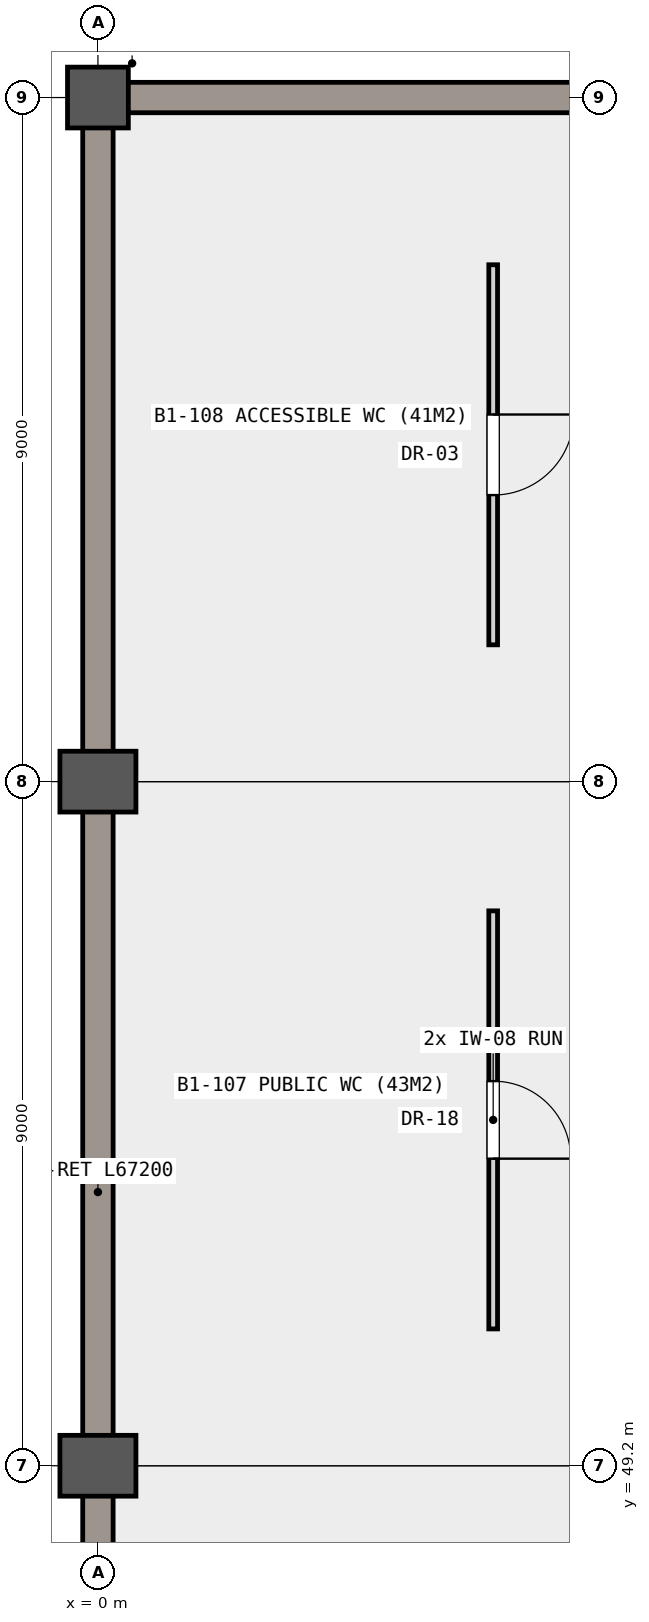
"""IFC4 building model, lengths in metres.
Left out: names, types, materials, properties, quantities, classifications, styles, units other than length and angle.
Written with IfcOpenShell. Run it as: python <this file> out.ifc"""

import sys

from ifc_helpers import new_model, si_unit, direction, frame, frame_2d, origin, origin_2d, place, context, subcontext, project, spatial, rectangle, extrude, element, fill, save


model = new_model("IFC4")
c1 = context("Model", 3, precision=1e-05, world=origin(), true_north=direction((0.0, 1.0)))
c2 = subcontext(c1, "Body", "Model", "MODEL_VIEW")
j1 = project(units=[si_unit("LENGTHUNIT", "METRE"), si_unit("PLANEANGLEUNIT", "RADIAN")], contexts=[c1])
p1 = place(None, origin())
s1 = spatial("IfcSite", under=j1, at=p1, CompositionType="ELEMENT")
p2 = place(p1, origin())
s2 = spatial("IfcBuilding", under=s1, at=p2, CompositionType="ELEMENT")
p3 = place(p2, frame((0.0, 0.0, -4.8)))
s3 = spatial("IfcBuildingStorey", under=s2, at=p3, CompositionType="ELEMENT", Elevation=-4.8)
for number, where, z_axis, x_axis in (
    (1, (0.0, 49.2, 0.0), (0.0, 0.0, 1.0), (1.0, 0.0, 0.0)),
    (2, (0.0, 58.2, 0.0), (0.0, 0.0, 1.0), (1.0, 0.0, 0.0)),
):
    element("IfcColumn", number, at=place(p3, frame(where, z_axis=z_axis, x_axis=x_axis)), inside=s3, PredefinedType="COLUMN", context=c2, shape_type="SweptSolid", body=[
        extrude(rectangle(XDim=1.0, YDim=0.8, at=origin_2d()), origin(), (0.0, 0.0, 1.0), 4.8),
    ])
p4 = place(p3, frame((0.0, 67.2, 0.0), z_axis=(0.0, 0.0, 1.0), x_axis=(1.0, 0.0, 0.0)))
e3 = element("IfcColumn", 3, at=p4, inside=s3, PredefinedType="COLUMN", context=c2, shape_type="SweptSolid", body=[
    extrude(rectangle(XDim=0.8, YDim=0.8, at=origin_2d()), origin(), (0.0, 0.0, 1.0), 4.8),
])
for number, where, z_axis, x_axis in (
    (4, (0.0, 0.0, 0.0), (0.0, 0.0, 1.0), (0.0, 1.0, 0.0)),
    (5, (0.0, 67.2, 0.0), (0.0, 0.0, 1.0), (1.0, 0.0, 0.0)),
):
    element("IfcWall", number, at=place(p3, frame(where, z_axis=z_axis, x_axis=x_axis)), inside=s3, PredefinedType="USERDEFINED", context=c2, shape_type="SweptSolid", body=[
        extrude(rectangle(XDim=67.2, YDim=0.4, at=frame_2d((33.6, 0.0))), origin(), (0.0, 0.0, 1.0), 3.88),
    ])
p5 = place(p3, frame((5.2, 56.5, 0.0), z_axis=(0.0, 0.0, 1.0), x_axis=(0.0, -1.0, 0.0)))
e6 = element("IfcWall", 6, at=p5, inside=s3, PredefinedType="PARTITIONING", context=c2, shape_type="SweptSolid", body=[
    extrude(rectangle(XDim=5.5, YDim=0.115, at=frame_2d((2.75, 0.0))), origin(), (0.0, 0.0, 1.0), 4.48),
])
p6 = place(p5, frame((2.24, 0.0, 0.0)))
e7 = element("IfcOpeningElement", 7, at=p6, cuts=e6, PredefinedType="OPENING", context=c2, shape_type="SweptSolid", body=[
    extrude(rectangle(XDim=1.02, YDim=2.14, at=frame_2d((0.51, 1.07))), frame((0.0, 0.067, 0.0), z_axis=(0.0, -1.0, 0.0), x_axis=(1.0, 0.0, 0.0)), (0.0, 0.0, 1.0), 0.135),
])
p7 = place(p3, frame((5.2, 65.0, 0.0), z_axis=(0.0, 0.0, 1.0), x_axis=(0.0, -1.0, 0.0)))
e8 = element("IfcWall", 8, at=p7, inside=s3, PredefinedType="PARTITIONING", context=c2, shape_type="SweptSolid", body=[
    extrude(rectangle(XDim=5.0, YDim=0.115, at=frame_2d((2.5, 0.0))), origin(), (0.0, 0.0, 1.0), 4.48),
])
p8 = place(p7, frame((1.97, 0.0, 0.0)))
e9 = element("IfcOpeningElement", 9, at=p8, cuts=e8, PredefinedType="OPENING", context=c2, shape_type="SweptSolid", body=[
    extrude(rectangle(XDim=1.06, YDim=2.14, at=frame_2d((0.53, 1.07))), frame((0.0, 0.067, 0.0), z_axis=(0.0, -1.0, 0.0), x_axis=(1.0, 0.0, 0.0)), (0.0, 0.0, 1.0), 0.135),
])
p9 = place(p6, origin())
e10 = element("IfcDoor", 10, at=p9, inside=s3, OperationType="SINGLE_SWING_RIGHT", PredefinedType="DOOR", context=c2, shape_type="SweptSolid", body=[
    extrude(rectangle(XDim=1.02, YDim=2.14, at=frame_2d((0.51, 1.07))), frame((0.0, 0.025, 0.0), z_axis=(0.0, -1.0, 0.0), x_axis=(1.0, 0.0, 0.0)), (0.0, 0.0, 1.0), 0.05),
])
fill(e7, e10)
p10 = place(p8, origin())
e11 = element("IfcDoor", 11, at=p10, inside=s3, OperationType="SINGLE_SWING_LEFT", PredefinedType="DOOR", context=c2, shape_type="SweptSolid", body=[
    extrude(rectangle(XDim=1.06, YDim=2.14, at=frame_2d((0.53, 1.07))), frame((0.0, 0.025, 0.0), z_axis=(0.0, -1.0, 0.0), x_axis=(1.0, 0.0, 0.0)), (0.0, 0.0, 1.0), 0.05),
])
fill(e9, e11)
save(model, sys.argv[1])
